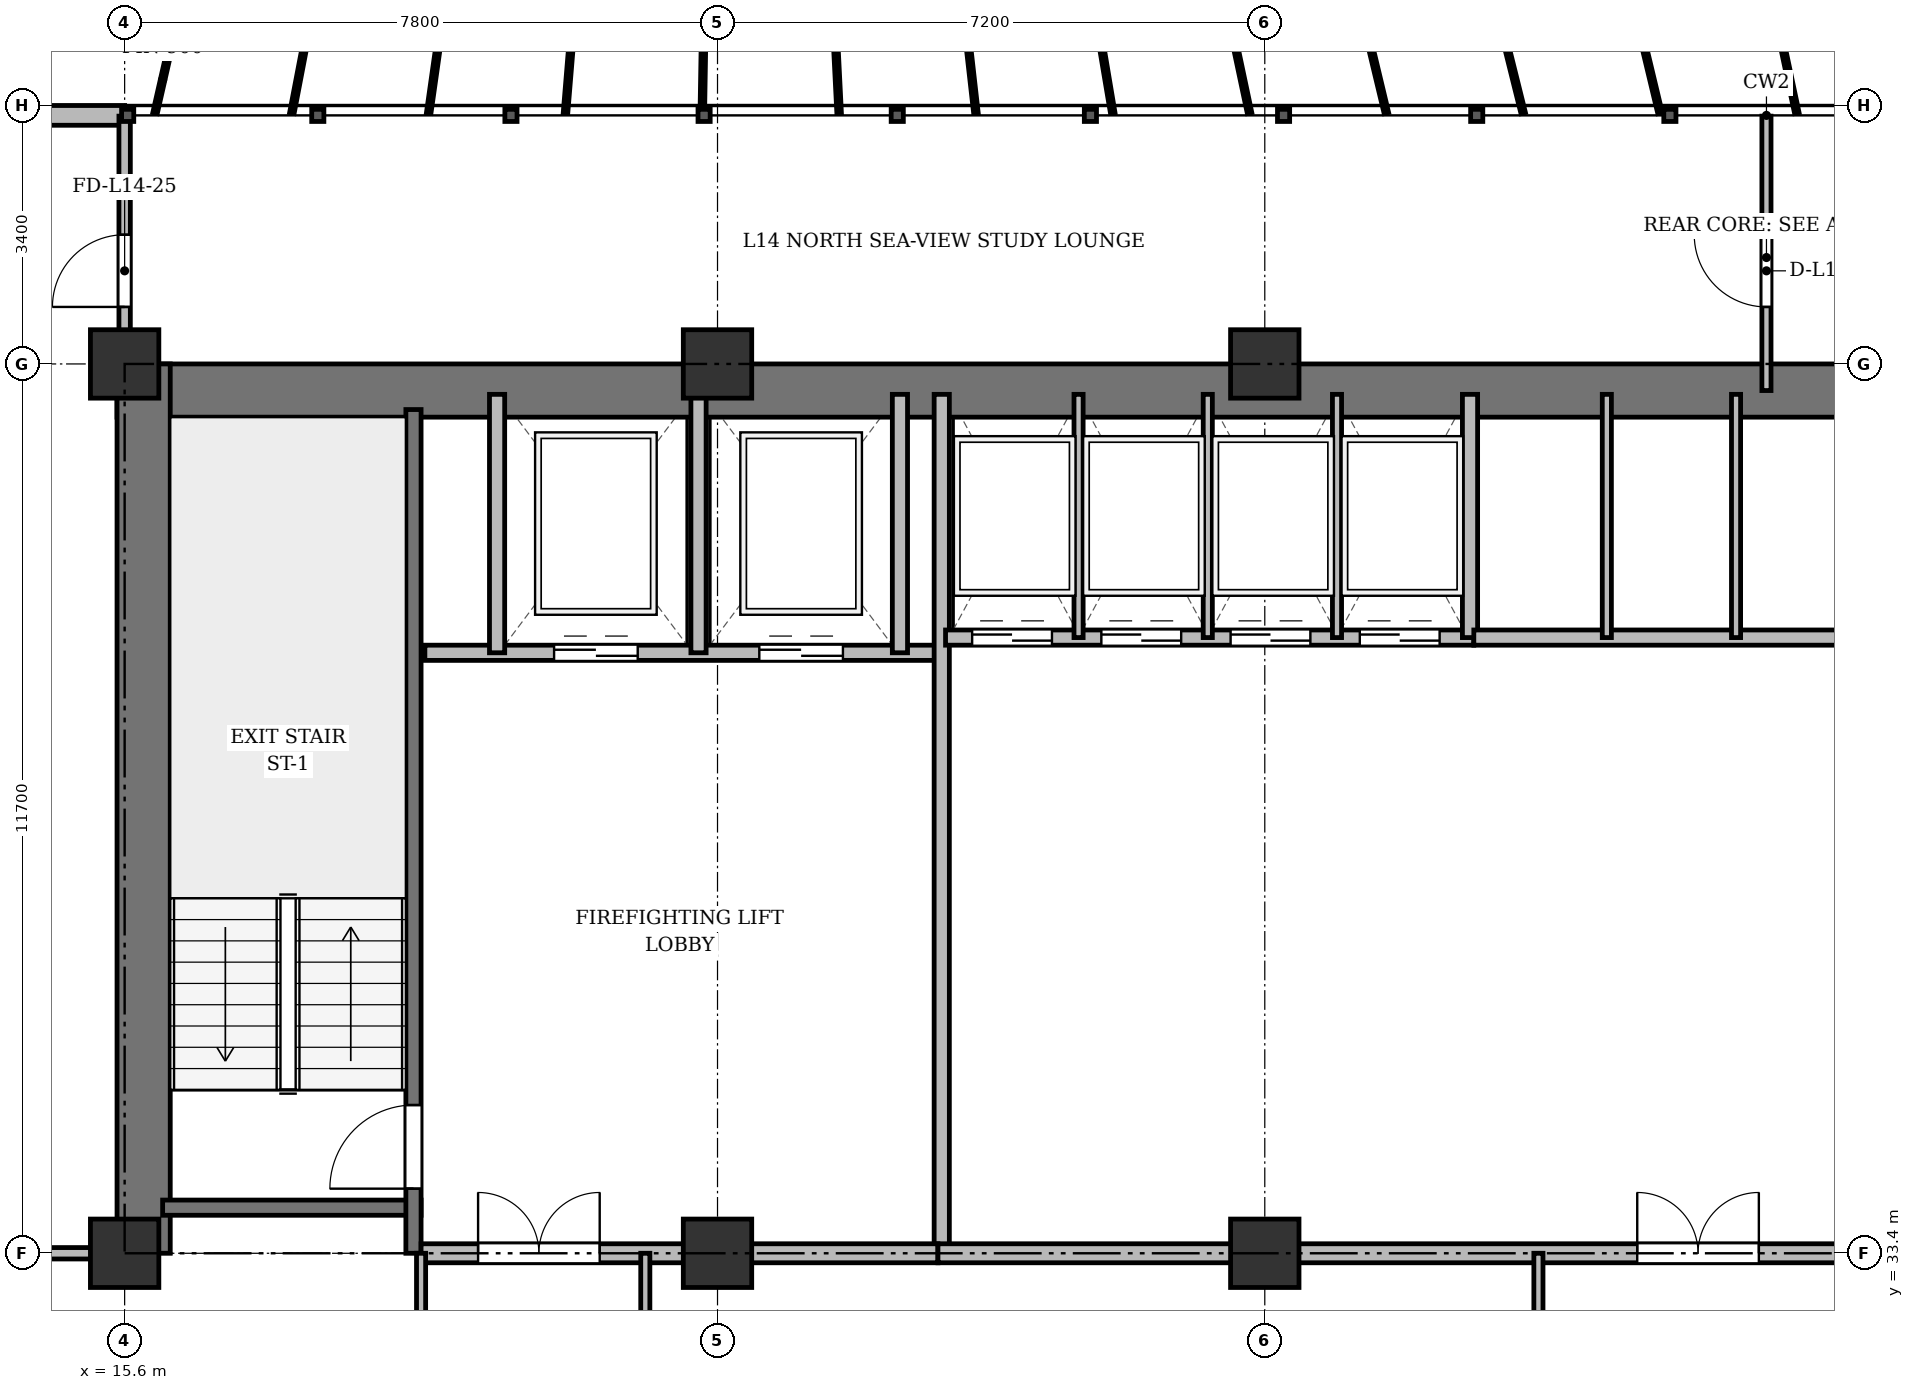
"""IFC4 building model, lengths in metres.
Left out: names, types, materials, properties, quantities, classifications, styles, units other than length and angle.
Written with IfcOpenShell. Run it as: python <this file> out.ifc"""

import sys

from ifc_helpers import new_model, si_unit, direction, frame, frame_2d, origin, origin_2d, place, context, subcontext, project, spatial, rectangle, extrude, source, transform, mapped, element, fill, save


model = new_model("IFC4")
c1 = context("Model", 3, precision=1e-05, world=origin(), true_north=direction((0.0, 1.0)))
c2 = subcontext(c1, "Body", "Model", "MODEL_VIEW")
j1 = project(units=[si_unit("LENGTHUNIT", "METRE"), si_unit("PLANEANGLEUNIT", "RADIAN")], contexts=[c1])
p1 = place(None, origin())
s1 = spatial("IfcSite", under=j1, at=p1, CompositionType="ELEMENT")
p2 = place(p1, origin())
s2 = spatial("IfcBuilding", under=s1, at=p2, CompositionType="ELEMENT")
p3 = place(p2, frame((0.0, 0.0, 55.9)))
s3 = spatial("IfcBuildingStorey", under=s2, at=p3, CompositionType="ELEMENT", Elevation=55.9)
m1 = source(origin(), c2, "Body", "SweptSolid", [
    extrude(rectangle(XDim=0.9, YDim=0.9, at=origin_2d()), origin(), (0.0, 0.0, 1.0), 3.6),
])
for number, where, z_axis, x_axis in (
    (1, (15.6, 33.4, 0.0), (0.0, 0.0, 1.0), (1.0, 0.0, 0.0)),
    (2, (15.6, 45.1, 0.0), (0.0, 0.0, 1.0), (1.0, 0.0, 0.0)),
    (3, (23.4, 33.4, 0.0), (0.0, 0.0, 1.0), (1.0, 0.0, 0.0)),
    (4, (23.4, 45.1, 0.0), (0.0, 0.0, 1.0), (1.0, 0.0, 0.0)),
    (5, (30.6, 33.4, 0.0), (0.0, 0.0, 1.0), (1.0, 0.0, 0.0)),
    (6, (30.6, 45.1, 0.0), (0.0, 0.0, 1.0), (1.0, 0.0, 0.0)),
):
    element("IfcColumn", number, at=place(p3, frame(where, z_axis=z_axis, x_axis=x_axis)), inside=s3, PredefinedType="COLUMN", context=c2, shape_type="MappedRepresentation", body=[
        mapped(m1, transform((0.0, 0.0, 0.0), x_axis=(1.0, 0.0, 0.0), y_axis=(0.0, 1.0, 0.0), z_axis=(0.0, 0.0, 1.0), scale=1.0)),
    ])
p4 = place(p3, frame((7.6, 48.37, 0.0), z_axis=(0.0, 0.0, 1.0), x_axis=(1.0, 0.0, 0.0)))
e7 = element("IfcWall", 7, at=p4, inside=s3, PredefinedType="SOLIDWALL", context=c2, shape_type="SweptSolid", body=[
    extrude(rectangle(XDim=8.0, YDim=0.26, at=frame_2d((4.0, 0.0))), origin(), (0.0, 0.0, 1.0), 3.34),
])
p5 = place(p4, frame((3.308, 0.0, 0.9)))
e8 = element("IfcOpeningElement", 8, at=p5, cuts=e7, PredefinedType="OPENING", context=c2, shape_type="SweptSolid", body=[
    extrude(rectangle(XDim=1.2, YDim=1.65, at=frame_2d((0.6, 0.825))), frame((0.0, 0.14, 0.0), z_axis=(0.0, -1.0, 0.0), x_axis=(1.0, 0.0, 0.0)), (0.0, 0.0, 1.0), 0.28),
])
p6 = place(p3, frame((15.5, 44.75, 0.0), z_axis=(0.0, 0.0, 1.0), x_axis=(1.0, 0.0, 0.0)))
e9 = element("IfcWall", 9, at=p6, inside=s3, PredefinedType="SHEAR", context=c2, shape_type="SweptSolid", body=[
    extrude(rectangle(XDim=43.4, YDim=0.7, at=frame_2d((21.7, 0.0))), origin(), (0.0, 0.0, 1.0), 3.34),
])
p7 = place(p3, frame((15.85, 33.4, 0.0), z_axis=(0.0, 0.0, 1.0), x_axis=(0.0, 1.0, 0.0)))
e10 = element("IfcWall", 10, at=p7, inside=s3, PredefinedType="SHEAR", context=c2, shape_type="SweptSolid", body=[
    extrude(rectangle(XDim=11.7, YDim=0.7, at=frame_2d((5.85, 0.0))), origin(), (0.0, 0.0, 1.0), 3.34),
])
p8 = place(p3, frame((16.1, 34.0, 0.0), z_axis=(0.0, 0.0, 1.0), x_axis=(1.0, 0.0, 0.0)))
e11 = element("IfcWall", 11, at=p8, inside=s3, PredefinedType="SHEAR", context=c2, shape_type="SweptSolid", body=[
    extrude(rectangle(XDim=3.4, YDim=0.2, at=frame_2d((1.7, 0.0))), origin(), (0.0, 0.0, 1.0), 3.34),
])
p9 = place(p3, frame((19.4, 33.4, 0.0), z_axis=(0.0, 0.0, 1.0), x_axis=(0.0, 1.0, 0.0)))
e12 = element("IfcWall", 12, at=p9, inside=s3, PredefinedType="SHEAR", context=c2, shape_type="SweptSolid", body=[
    extrude(rectangle(XDim=11.1, YDim=0.2, at=frame_2d((5.55, 0.0))), origin(), (0.0, 0.0, 1.0), 3.34),
])
p10 = place(p9, frame((0.85, 0.0, 0.0)))
e13 = element("IfcOpeningElement", 13, at=p10, cuts=e12, PredefinedType="OPENING", context=c2, shape_type="SweptSolid", body=[
    extrude(rectangle(XDim=1.1, YDim=2.15, at=frame_2d((0.55, 1.075))), frame((0.0, 0.11, 0.0), z_axis=(0.0, -1.0, 0.0), x_axis=(1.0, 0.0, 0.0)), (0.0, 0.0, 1.0), 0.22),
])
p11 = place(p3, frame((19.55, 41.3, 0.0), z_axis=(0.0, 0.0, 1.0), x_axis=(1.0, 0.0, 0.0)))
e14 = element("IfcWall", 14, at=p11, inside=s3, PredefinedType="SOLIDWALL", context=c2, shape_type="SweptSolid", body=[
    extrude(rectangle(XDim=6.75, YDim=0.2, at=frame_2d((3.375, 0.0))), origin(), (0.0, 0.0, 1.0), 3.34),
])
p12 = place(p11, frame((1.7, 0.0, 0.0)))
e15 = element("IfcOpeningElement", 15, at=p12, cuts=e14, PredefinedType="OPENING", context=c2, shape_type="SweptSolid", body=[
    extrude(rectangle(XDim=1.1, YDim=2.15, at=frame_2d((0.55, 1.075))), frame((0.0, 0.11, 0.0), z_axis=(0.0, -1.0, 0.0), x_axis=(1.0, 0.0, 0.0)), (0.0, 0.0, 1.0), 0.22),
])
p13 = place(p11, frame((4.4, 0.0, 0.0)))
e16 = element("IfcOpeningElement", 16, at=p13, cuts=e14, PredefinedType="OPENING", context=c2, shape_type="SweptSolid", body=[
    extrude(rectangle(XDim=1.1, YDim=2.15, at=frame_2d((0.55, 1.075))), frame((0.0, 0.11, 0.0), z_axis=(0.0, -1.0, 0.0), x_axis=(1.0, 0.0, 0.0)), (0.0, 0.0, 1.0), 0.22),
])
for number, where, z_axis, x_axis in (
    (17, (20.5, 41.3, 0.0), (0.0, 0.0, 1.0), (0.0, 1.0, 0.0)),
    (18, (23.15, 41.3, 0.0), (0.0, 0.0, 1.0), (0.0, 1.0, 0.0)),
    (19, (25.8, 41.3, 0.0), (0.0, 0.0, 1.0), (0.0, 1.0, 0.0)),
):
    element("IfcWall", number, at=place(p3, frame(where, z_axis=z_axis, x_axis=x_axis)), inside=s3, PredefinedType="SOLIDWALL", context=c2, shape_type="SweptSolid", body=[
        extrude(rectangle(XDim=3.4, YDim=0.2, at=frame_2d((1.7, 0.0))), origin(), (0.0, 0.0, 1.0), 3.34),
    ])
p14 = place(p3, frame((26.35, 33.4, 0.0), z_axis=(0.0, 0.0, 1.0), x_axis=(0.0, 1.0, 0.0)))
e20 = element("IfcWall", 20, at=p14, inside=s3, PredefinedType="SOLIDWALL", context=c2, shape_type="SweptSolid", body=[
    extrude(rectangle(XDim=11.3, YDim=0.2, at=frame_2d((5.65, 0.0))), origin(), (0.0, 0.0, 1.0), 2.69),
])
p15 = place(p3, frame((19.5, 33.4, 0.0), z_axis=(0.0, 0.0, 1.0), x_axis=(1.0, 0.0, 0.0)))
e21 = element("IfcWall", 21, at=p15, inside=s3, PredefinedType="PARTITIONING", context=c2, shape_type="SweptSolid", body=[
    extrude(rectangle(XDim=6.8, YDim=0.25, at=frame_2d((3.4, 0.0))), origin(), (0.0, 0.0, 1.0), 2.69),
])
p16 = place(p15, frame((0.75, 0.0, 0.0)))
e22 = element("IfcOpeningElement", 22, at=p16, cuts=e21, PredefinedType="OPENING", context=c2, shape_type="SweptSolid", body=[
    extrude(rectangle(XDim=1.6, YDim=2.2, at=frame_2d((0.8, 1.1))), frame((0.0, 0.135, 0.0), z_axis=(0.0, -1.0, 0.0), x_axis=(1.0, 0.0, 0.0)), (0.0, 0.0, 1.0), 0.27),
])
p17 = place(p3, frame((26.4, 41.5, 0.0), z_axis=(0.0, 0.0, 1.0), x_axis=(1.0, 0.0, 0.0)))
e23 = element("IfcWall", 23, at=p17, inside=s3, PredefinedType="SOLIDWALL", context=c2, shape_type="SweptSolid", body=[
    extrude(rectangle(XDim=6.95, YDim=0.2, at=frame_2d((3.475, 0.0))), origin(), (0.0, 0.0, 1.0), 3.34),
])
p18 = place(p17, frame((0.35, 0.0, 0.0)))
e24 = element("IfcOpeningElement", 24, at=p18, cuts=e23, PredefinedType="OPENING", context=c2, shape_type="SweptSolid", body=[
    extrude(rectangle(XDim=1.05, YDim=2.15, at=frame_2d((0.525, 1.075))), frame((0.0, 0.11, 0.0), z_axis=(0.0, -1.0, 0.0), x_axis=(1.0, 0.0, 0.0)), (0.0, 0.0, 1.0), 0.22),
])
p19 = place(p17, frame((2.05, 0.0, 0.0)))
e25 = element("IfcOpeningElement", 25, at=p19, cuts=e23, PredefinedType="OPENING", context=c2, shape_type="SweptSolid", body=[
    extrude(rectangle(XDim=1.05, YDim=2.15, at=frame_2d((0.525, 1.075))), frame((0.0, 0.11, 0.0), z_axis=(0.0, -1.0, 0.0), x_axis=(1.0, 0.0, 0.0)), (0.0, 0.0, 1.0), 0.22),
])
p20 = place(p17, frame((3.75, 0.0, 0.0)))
e26 = element("IfcOpeningElement", 26, at=p20, cuts=e23, PredefinedType="OPENING", context=c2, shape_type="SweptSolid", body=[
    extrude(rectangle(XDim=1.05, YDim=2.15, at=frame_2d((0.525, 1.075))), frame((0.0, 0.11, 0.0), z_axis=(0.0, -1.0, 0.0), x_axis=(1.0, 0.0, 0.0)), (0.0, 0.0, 1.0), 0.22),
])
p21 = place(p17, frame((5.45, 0.0, 0.0)))
e27 = element("IfcOpeningElement", 27, at=p21, cuts=e23, PredefinedType="OPENING", context=c2, shape_type="SweptSolid", body=[
    extrude(rectangle(XDim=1.05, YDim=2.15, at=frame_2d((0.525, 1.075))), frame((0.0, 0.11, 0.0), z_axis=(0.0, -1.0, 0.0), x_axis=(1.0, 0.0, 0.0)), (0.0, 0.0, 1.0), 0.22),
])
p22 = place(p3, frame((33.3, 41.5, 0.0), z_axis=(0.0, 0.0, 1.0), x_axis=(0.0, 1.0, 0.0)))
e28 = element("IfcWall", 28, at=p22, inside=s3, PredefinedType="SOLIDWALL", context=c2, shape_type="SweptSolid", body=[
    extrude(rectangle(XDim=3.2, YDim=0.2, at=frame_2d((1.6, 0.0))), origin(), (0.0, 0.0, 1.0), 3.34),
])
for number, where, z_axis, x_axis in (
    (29, (28.15, 41.5, 0.0), (0.0, 0.0, 1.0), (0.0, 1.0, 0.0)),
    (30, (29.85, 41.5, 0.0), (0.0, 0.0, 1.0), (0.0, 1.0, 0.0)),
    (31, (31.55, 41.5, 0.0), (0.0, 0.0, 1.0), (0.0, 1.0, 0.0)),
):
    element("IfcWall", number, at=place(p3, frame(where, z_axis=z_axis, x_axis=x_axis)), inside=s3, PredefinedType="PARTITIONING", context=c2, shape_type="SweptSolid", body=[
        extrude(rectangle(XDim=3.2, YDim=0.12, at=frame_2d((1.6, 0.0))), origin(), (0.0, 0.0, 1.0), 3.34),
    ])
p23 = place(p3, frame((33.35, 41.5, 0.0), z_axis=(0.0, 0.0, 1.0), x_axis=(1.0, 0.0, 0.0)))
e32 = element("IfcWall", 32, at=p23, inside=s3, PredefinedType="SOLIDWALL", context=c2, shape_type="SweptSolid", body=[
    extrude(rectangle(XDim=6.9, YDim=0.2, at=frame_2d((3.45, 0.0))), origin(), (0.0, 0.0, 1.0), 3.34),
])
for number, where, z_axis, x_axis in (
    (33, (35.1, 41.5, 0.0), (0.0, 0.0, 1.0), (0.0, 1.0, 0.0)),
    (34, (36.8, 41.5, 0.0), (0.0, 0.0, 1.0), (0.0, 1.0, 0.0)),
):
    element("IfcWall", number, at=place(p3, frame(where, z_axis=z_axis, x_axis=x_axis)), inside=s3, PredefinedType="PARTITIONING", context=c2, shape_type="SweptSolid", body=[
        extrude(rectangle(XDim=3.2, YDim=0.12, at=frame_2d((1.6, 0.0))), origin(), (0.0, 0.0, 1.0), 3.34),
    ])
p24 = place(p3, frame((26.3, 33.4, 0.0), z_axis=(0.0, 0.0, 1.0), x_axis=(1.0, 0.0, 0.0)))
e35 = element("IfcWall", 35, at=p24, inside=s3, PredefinedType="PARTITIONING", context=c2, shape_type="SweptSolid", body=[
    extrude(rectangle(XDim=20.85, YDim=0.25, at=frame_2d((10.425, 0.0))), origin(), (0.0, 0.0, 1.0), 2.69),
])
p25 = place(p24, frame((9.2, 0.0, 0.0)))
e36 = element("IfcOpeningElement", 36, at=p25, cuts=e35, PredefinedType="OPENING", context=c2, shape_type="SweptSolid", body=[
    extrude(rectangle(XDim=1.6, YDim=2.2, at=frame_2d((0.8, 1.1))), frame((0.0, 0.135, 0.0), z_axis=(0.0, -1.0, 0.0), x_axis=(1.0, 0.0, 0.0)), (0.0, 0.0, 1.0), 0.27),
])
for number, where, z_axis, x_axis in (
    (37, (19.5, 29.8, 0.0), (0.0, 0.0, 1.0), (0.0, 1.0, 0.0)),
    (38, (22.45, 29.8, 0.0), (0.0, 0.0, 1.0), (0.0, 1.0, 0.0)),
    (39, (34.2, 29.8, 0.0), (0.0, 0.0, 1.0), (0.0, 1.0, 0.0)),
):
    element("IfcWall", number, at=place(p3, frame(where, z_axis=z_axis, x_axis=x_axis)), inside=s3, PredefinedType="PARTITIONING", context=c2, shape_type="SweptSolid", body=[
        extrude(rectangle(XDim=3.6, YDim=0.12, at=frame_2d((1.8, 0.0))), origin(), (0.0, 0.0, 1.0), 2.69),
    ])
p26 = place(p3, frame((4.75, 33.4, 0.0), z_axis=(0.0, 0.0, 1.0), x_axis=(1.0, 0.0, 0.0)))
e40 = element("IfcWall", 40, at=p26, inside=s3, PredefinedType="PARTITIONING", context=c2, shape_type="SweptSolid", body=[
    extrude(rectangle(XDim=10.85, YDim=0.15, at=frame_2d((5.425, 0.0))), origin(), (0.0, 0.0, 1.0), 2.69),
])
p27 = place(p26, frame((4.94, 0.0, 0.0)))
e41 = element("IfcOpeningElement", 41, at=p27, cuts=e40, PredefinedType="OPENING", context=c2, shape_type="SweptSolid", body=[
    extrude(rectangle(XDim=0.95, YDim=2.15, at=frame_2d((0.475, 1.075))), frame((0.0, 0.085, 0.0), z_axis=(0.0, -1.0, 0.0), x_axis=(1.0, 0.0, 0.0)), (0.0, 0.0, 1.0), 0.17),
])
p28 = place(p3, frame((37.2, 44.75, 0.0), z_axis=(0.0, 0.0, 1.0), x_axis=(0.0, 1.0, 0.0)))
e42 = element("IfcWall", 42, at=p28, inside=s3, PredefinedType="PARTITIONING", context=c2, shape_type="SweptSolid", body=[
    extrude(rectangle(XDim=3.61, YDim=0.12, at=frame_2d((1.805, 0.0))), origin(), (0.0, 0.0, 1.0), 2.69),
])
p29 = place(p28, frame((1.1, 0.0, 0.0)))
e43 = element("IfcOpeningElement", 43, at=p29, cuts=e42, PredefinedType="OPENING", context=c2, shape_type="SweptSolid", body=[
    extrude(rectangle(XDim=0.95, YDim=2.15, at=frame_2d((0.475, 1.075))), frame((0.0, 0.07, 0.0), z_axis=(0.0, -1.0, 0.0), x_axis=(1.0, 0.0, 0.0)), (0.0, 0.0, 1.0), 0.14),
])
p30 = place(p3, frame((15.6, 44.75, 0.0), z_axis=(0.0, 0.0, 1.0), x_axis=(0.0, 1.0, 0.0)))
e44 = element("IfcWall", 44, at=p30, inside=s3, PredefinedType="PARTITIONING", context=c2, shape_type="SweptSolid", body=[
    extrude(rectangle(XDim=3.61, YDim=0.15, at=frame_2d((1.805, 0.0))), origin(), (0.0, 0.0, 1.0), 2.752),
])
p31 = place(p30, frame((1.1, 0.0, 0.0)))
e45 = element("IfcOpeningElement", 45, at=p31, cuts=e44, PredefinedType="OPENING", context=c2, shape_type="SweptSolid", body=[
    extrude(rectangle(XDim=0.95, YDim=2.15, at=frame_2d((0.475, 1.075))), frame((0.0, 0.085, 0.0), z_axis=(0.0, -1.0, 0.0), x_axis=(1.0, 0.0, 0.0)), (0.0, 0.0, 1.0), 0.17),
])
m2 = source(origin(), c2, "Body", "SweptSolid", [
    extrude(rectangle(XDim=1.1, YDim=2.15, at=frame_2d((0.55, 1.075))), frame((0.0, 0.025, 0.0), z_axis=(0.0, -1.0, 0.0), x_axis=(1.0, 0.0, 0.0)), (0.0, 0.0, 1.0), 0.05),
])
p32 = place(p10, origin())
e46 = element("IfcDoor", 46, at=p32, inside=s3, OperationType="SINGLE_SWING_LEFT", PredefinedType="DOOR", context=c2, shape_type="MappedRepresentation", body=[
    mapped(m2, transform((0.0, 0.0, 0.0), x_axis=(1.0, 0.0, 0.0), y_axis=(0.0, 1.0, 0.0), z_axis=(0.0, 0.0, 1.0), scale=1.0)),
])
fill(e13, e46)
p33 = place(p12, origin())
e47 = element("IfcDoor", 47, at=p33, inside=s3, OperationType="DOUBLE_DOOR_SLIDING", PredefinedType="DOOR", context=c2, shape_type="MappedRepresentation", body=[
    mapped(m2, transform((0.0, 0.0, 0.0), x_axis=(1.0, 0.0, 0.0), y_axis=(0.0, 1.0, 0.0), z_axis=(0.0, 0.0, 1.0), scale=1.0)),
])
fill(e15, e47)
p34 = place(p13, origin())
e48 = element("IfcDoor", 48, at=p34, inside=s3, OperationType="DOUBLE_DOOR_SLIDING", PredefinedType="DOOR", context=c2, shape_type="MappedRepresentation", body=[
    mapped(m2, transform((0.0, 0.0, 0.0), x_axis=(1.0, 0.0, 0.0), y_axis=(0.0, 1.0, 0.0), z_axis=(0.0, 0.0, 1.0), scale=1.0)),
])
fill(e16, e48)
m3 = source(origin(), c2, "Body", "SweptSolid", [
    extrude(rectangle(XDim=1.6, YDim=2.2, at=frame_2d((0.8, 1.1))), frame((0.0, 0.025, 0.0), z_axis=(0.0, -1.0, 0.0), x_axis=(1.0, 0.0, 0.0)), (0.0, 0.0, 1.0), 0.05),
])
p35 = place(p16, origin())
e49 = element("IfcDoor", 49, at=p35, inside=s3, OperationType="DOUBLE_DOOR_SINGLE_SWING", PredefinedType="DOOR", context=c2, shape_type="MappedRepresentation", body=[
    mapped(m3, transform((0.0, 0.0, 0.0), x_axis=(1.0, 0.0, 0.0), y_axis=(0.0, 1.0, 0.0), z_axis=(0.0, 0.0, 1.0), scale=1.0)),
])
fill(e22, e49)
m4 = source(origin(), c2, "Body", "SweptSolid", [
    extrude(rectangle(XDim=1.05, YDim=2.15, at=frame_2d((0.525, 1.075))), frame((0.0, 0.025, 0.0), z_axis=(0.0, -1.0, 0.0), x_axis=(1.0, 0.0, 0.0)), (0.0, 0.0, 1.0), 0.05),
])
p36 = place(p18, origin())
e50 = element("IfcDoor", 50, at=p36, inside=s3, OperationType="DOUBLE_DOOR_SLIDING", PredefinedType="DOOR", context=c2, shape_type="MappedRepresentation", body=[
    mapped(m4, transform((0.0, 0.0, 0.0), x_axis=(1.0, 0.0, 0.0), y_axis=(0.0, 1.0, 0.0), z_axis=(0.0, 0.0, 1.0), scale=1.0)),
])
fill(e24, e50)
p37 = place(p19, origin())
e51 = element("IfcDoor", 51, at=p37, inside=s3, OperationType="DOUBLE_DOOR_SLIDING", PredefinedType="DOOR", context=c2, shape_type="MappedRepresentation", body=[
    mapped(m4, transform((0.0, 0.0, 0.0), x_axis=(1.0, 0.0, 0.0), y_axis=(0.0, 1.0, 0.0), z_axis=(0.0, 0.0, 1.0), scale=1.0)),
])
fill(e25, e51)
p38 = place(p20, origin())
e52 = element("IfcDoor", 52, at=p38, inside=s3, OperationType="DOUBLE_DOOR_SLIDING", PredefinedType="DOOR", context=c2, shape_type="MappedRepresentation", body=[
    mapped(m4, transform((0.0, 0.0, 0.0), x_axis=(1.0, 0.0, 0.0), y_axis=(0.0, 1.0, 0.0), z_axis=(0.0, 0.0, 1.0), scale=1.0)),
])
fill(e26, e52)
p39 = place(p21, origin())
e53 = element("IfcDoor", 53, at=p39, inside=s3, OperationType="DOUBLE_DOOR_SLIDING", PredefinedType="DOOR", context=c2, shape_type="MappedRepresentation", body=[
    mapped(m4, transform((0.0, 0.0, 0.0), x_axis=(1.0, 0.0, 0.0), y_axis=(0.0, 1.0, 0.0), z_axis=(0.0, 0.0, 1.0), scale=1.0)),
])
fill(e27, e53)
p40 = place(p25, origin())
e54 = element("IfcDoor", 54, at=p40, inside=s3, OperationType="DOUBLE_DOOR_SINGLE_SWING", PredefinedType="DOOR", context=c2, shape_type="MappedRepresentation", body=[
    mapped(m3, transform((0.0, 0.0, 0.0), x_axis=(1.0, 0.0, 0.0), y_axis=(0.0, 1.0, 0.0), z_axis=(0.0, 0.0, 1.0), scale=1.0)),
])
fill(e36, e54)
m5 = source(origin(), c2, "Body", "SweptSolid", [
    extrude(rectangle(XDim=0.95, YDim=2.15, at=frame_2d((0.475, 1.075))), frame((0.0, 0.025, 0.0), z_axis=(0.0, -1.0, 0.0), x_axis=(1.0, 0.0, 0.0)), (0.0, 0.0, 1.0), 0.05),
])
p41 = place(p29, origin())
e55 = element("IfcDoor", 55, at=p41, inside=s3, OperationType="SINGLE_SWING_RIGHT", PredefinedType="DOOR", context=c2, shape_type="MappedRepresentation", body=[
    mapped(m5, transform((0.0, 0.0, 0.0), x_axis=(1.0, 0.0, 0.0), y_axis=(0.0, 1.0, 0.0), z_axis=(0.0, 0.0, 1.0), scale=1.0)),
])
fill(e43, e55)
p42 = place(p31, origin())
e56 = element("IfcDoor", 56, at=p42, inside=s3, OperationType="SINGLE_SWING_LEFT", PredefinedType="DOOR", context=c2, shape_type="MappedRepresentation", body=[
    mapped(m5, transform((0.0, 0.0, 0.0), x_axis=(1.0, 0.0, 0.0), y_axis=(0.0, 1.0, 0.0), z_axis=(0.0, 0.0, 1.0), scale=1.0)),
])
fill(e45, e56)
save(model, sys.argv[1])
